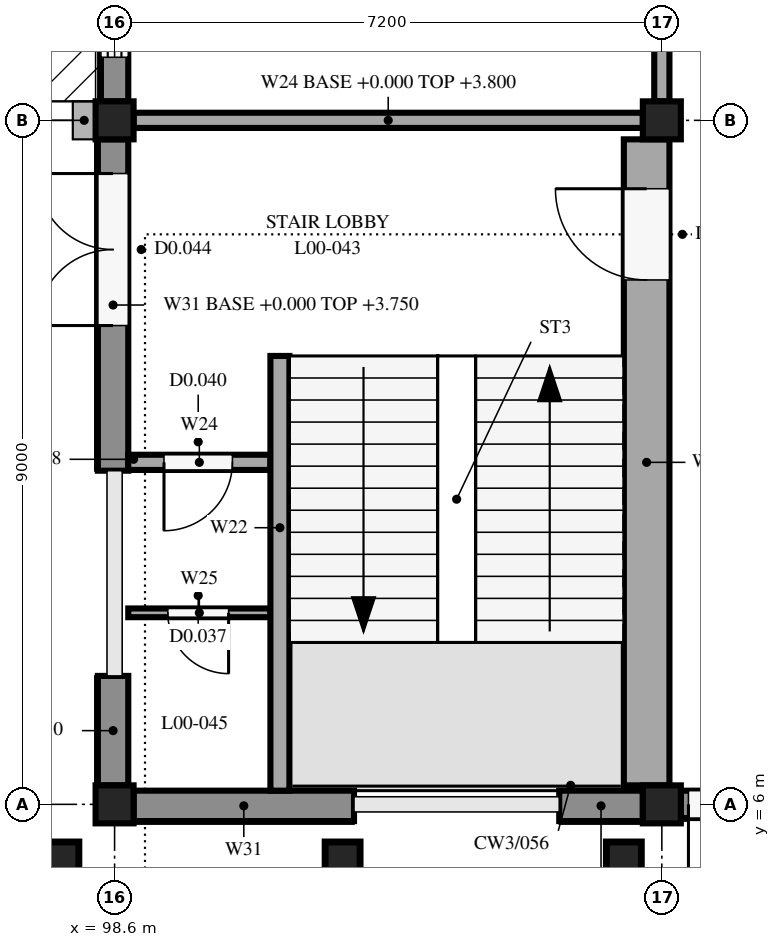
"""IFC4 building model, lengths in metres.
Left out: names, types, materials, properties, quantities, classifications, styles, units other than length and angle.
Written with IfcOpenShell. Run it as: python <this file> out.ifc"""

import sys

from ifc_helpers import new_model, si_unit, direction, frame, frame_2d, origin, origin_2d, place, context, subcontext, project, spatial, rectangle, extrude, element, fill, save


model = new_model("IFC4")
c1 = context("Model", 3, precision=1e-05, world=origin(), true_north=direction((0.0, 1.0)))
c2 = subcontext(c1, "Body", "Model", "MODEL_VIEW")
j1 = project(units=[si_unit("LENGTHUNIT", "METRE"), si_unit("PLANEANGLEUNIT", "RADIAN")], contexts=[c1])
p1 = place(None, origin())
s1 = spatial("IfcSite", under=j1, at=p1, CompositionType="ELEMENT")
p2 = place(p1, origin())
s2 = spatial("IfcBuilding", under=s1, at=p2, CompositionType="ELEMENT")
p3 = place(p2, origin())
s3 = spatial("IfcBuildingStorey", under=s2, at=p3, CompositionType="ELEMENT", Elevation=0.0)
for number, where, z_axis, x_axis in (
    (1, (98.6, 6.0, 0.0), (0.0, 0.0, 1.0), (1.0, 0.0, 0.0)),
    (2, (98.6, 15.0, 0.0), (0.0, 0.0, 1.0), (1.0, 0.0, 0.0)),
    (3, (105.8, 6.0, 0.0), (0.0, 0.0, 1.0), (1.0, 0.0, 0.0)),
    (4, (105.8, 15.0, 0.0), (0.0, 0.0, 1.0), (1.0, 0.0, 0.0)),
):
    element("IfcColumn", number, at=place(p3, frame(where, z_axis=z_axis, x_axis=x_axis)), inside=s3, PredefinedType="COLUMN", context=c2, shape_type="SweptSolid", body=[
        extrude(rectangle(XDim=0.5, YDim=0.5, at=origin_2d()), origin(), (0.0, 0.0, 1.0), 4.25),
    ])
for number, where, z_axis, x_axis in (
    (5, (97.9, 5.275, -0.3), (0.0, 0.0, 1.0), (1.0, 0.0, 0.0)),
    (6, (101.6, 5.275, -0.3), (0.0, 0.0, 1.0), (1.0, 0.0, 0.0)),
    (7, (105.3, 5.275, -0.3), (0.0, 0.0, 1.0), (1.0, 0.0, 0.0)),
):
    element("IfcColumn", number, at=place(p3, frame(where, z_axis=z_axis, x_axis=x_axis)), inside=s3, PredefinedType="COLUMN", context=c2, shape_type="SweptSolid", body=[
        extrude(rectangle(XDim=0.45, YDim=0.45, at=origin_2d()), origin(), (0.0, 0.0, 1.0), 3.95),
    ])
p4 = place(p3, frame((98.58, 6.25, 0.0), z_axis=(0.0, 0.0, 1.0), x_axis=(0.0, 1.0, 0.0)))
e8 = element("IfcWall", 8, at=p4, inside=s3, PredefinedType="STANDARD", context=c2, shape_type="SweptSolid", body=[
    extrude(rectangle(XDim=1.44, YDim=0.4, at=frame_2d((0.72, 0.0))), origin(), (0.0, 0.0, 1.0), 3.75),
])
p5 = place(p3, frame((98.58, 10.39, 0.0), z_axis=(0.0, 0.0, 1.0), x_axis=(0.0, 1.0, 0.0)))
e9 = element("IfcWall", 9, at=p5, inside=s3, PredefinedType="STANDARD", context=c2, shape_type="SweptSolid", body=[
    extrude(rectangle(XDim=4.36, YDim=0.4, at=frame_2d((2.18, 0.0))), origin(), (0.0, 0.0, 1.0), 3.75),
])
p6 = place(p5, frame((1.91, 0.0, 0.0)))
e10 = element("IfcOpeningElement", 10, at=p6, cuts=e9, PredefinedType="OPENING", context=c2, shape_type="SweptSolid", body=[
    extrude(rectangle(XDim=2.0, YDim=2.2, at=frame_2d((1.0, 1.1))), frame((0.0, 0.21, 0.0), z_axis=(0.0, -1.0, 0.0), x_axis=(1.0, 0.0, 0.0)), (0.0, 0.0, 1.0), 0.42),
])
p7 = place(p3, frame((98.6, 15.25, 0.0), z_axis=(0.0, 0.0, 1.0), x_axis=(0.0, 1.0, 0.0)))
e11 = element("IfcWall", 11, at=p7, inside=s3, PredefinedType="STANDARD", context=c2, shape_type="SweptSolid", body=[
    extrude(rectangle(XDim=8.5, YDim=0.36, at=frame_2d((4.25, 0.0))), origin(), (0.0, 0.0, 1.0), 3.75),
])
p8 = place(p7, frame((0.58, 0.0, 1.2)))
e12 = element("IfcOpeningElement", 12, at=p8, cuts=e11, PredefinedType="OPENING", context=c2, shape_type="SweptSolid", body=[
    extrude(rectangle(XDim=1.4, YDim=2.4, at=frame_2d((0.7, 1.2))), frame((0.0, 0.19, 0.0), z_axis=(0.0, -1.0, 0.0), x_axis=(1.0, 0.0, 0.0)), (0.0, 0.0, 1.0), 0.38),
])
p9 = place(p7, frame((2.56, 0.0, 1.2)))
e13 = element("IfcOpeningElement", 13, at=p9, cuts=e11, PredefinedType="OPENING", context=c2, shape_type="SweptSolid", body=[
    extrude(rectangle(XDim=1.4, YDim=2.4, at=frame_2d((0.7, 1.2))), frame((0.0, 0.19, 0.0), z_axis=(0.0, -1.0, 0.0), x_axis=(1.0, 0.0, 0.0)), (0.0, 0.0, 1.0), 0.38),
])
p10 = place(p7, frame((4.54, 0.0, 1.2)))
e14 = element("IfcOpeningElement", 14, at=p10, cuts=e11, PredefinedType="OPENING", context=c2, shape_type="SweptSolid", body=[
    extrude(rectangle(XDim=1.4, YDim=2.4, at=frame_2d((0.7, 1.2))), frame((0.0, 0.19, 0.0), z_axis=(0.0, -1.0, 0.0), x_axis=(1.0, 0.0, 0.0)), (0.0, 0.0, 1.0), 0.38),
])
p11 = place(p7, frame((6.52, 0.0, 1.2)))
e15 = element("IfcOpeningElement", 15, at=p11, cuts=e11, PredefinedType="OPENING", context=c2, shape_type="SweptSolid", body=[
    extrude(rectangle(XDim=1.4, YDim=2.4, at=frame_2d((0.7, 1.2))), frame((0.0, 0.19, 0.0), z_axis=(0.0, -1.0, 0.0), x_axis=(1.0, 0.0, 0.0)), (0.0, 0.0, 1.0), 0.38),
])
p12 = place(p3, frame((101.75, 5.98, 0.0), z_axis=(0.0, 0.0, 1.0), x_axis=(-1.0, 0.0, 0.0)))
e16 = element("IfcWall", 16, at=p12, inside=s3, PredefinedType="STANDARD", context=c2, shape_type="SweptSolid", body=[
    extrude(rectangle(XDim=2.9, YDim=0.4, at=frame_2d((1.45, 0.0))), origin(), (0.0, 0.0, 1.0), 3.8),
])
p13 = place(p3, frame((105.55, 5.98, 0.0), z_axis=(0.0, 0.0, 1.0), x_axis=(-1.0, 0.0, 0.0)))
e17 = element("IfcWall", 17, at=p13, inside=s3, PredefinedType="STANDARD", context=c2, shape_type="SweptSolid", body=[
    extrude(rectangle(XDim=1.1, YDim=0.4, at=frame_2d((0.55, 0.0))), origin(), (0.0, 0.0, 1.0), 3.8),
])
p14 = place(p3, frame((108.25, 6.0, 0.0), z_axis=(0.0, 0.0, 1.0), x_axis=(-1.0, 0.0, 0.0)))
e18 = element("IfcWall", 18, at=p14, inside=s3, PredefinedType="STANDARD", context=c2, shape_type="SweptSolid", body=[
    extrude(rectangle(XDim=2.2, YDim=0.36, at=frame_2d((1.1, 0.0))), origin(), (0.0, 0.0, 1.0), 3.9),
])
p15 = place(p14, frame((0.1, 0.0, 0.0)))
e19 = element("IfcOpeningElement", 19, at=p15, cuts=e18, PredefinedType="OPENING", context=c2, shape_type="SweptSolid", body=[
    extrude(rectangle(XDim=2.0, YDim=2.4, at=frame_2d((1.0, 1.2))), frame((0.0, 0.19, 0.0), z_axis=(0.0, -1.0, 0.0), x_axis=(1.0, 0.0, 0.0)), (0.0, 0.0, 1.0), 0.38),
])
p16 = place(p3, frame((100.775, 6.18, 0.0), z_axis=(0.0, 0.0, 1.0), x_axis=(0.0, 1.0, 0.0)))
e20 = element("IfcWall", 20, at=p16, inside=s3, PredefinedType="SOLIDWALL", context=c2, shape_type="SweptSolid", body=[
    extrude(rectangle(XDim=5.72, YDim=0.25, at=frame_2d((2.86, 0.0))), origin(), (0.0, 0.0, 1.0), 4.25),
])
p17 = place(p3, frame((105.6, 6.25, 0.0), z_axis=(0.0, 0.0, 1.0), x_axis=(0.0, 1.0, 0.0)))
e21 = element("IfcWall", 21, at=p17, inside=s3, PredefinedType="SOLIDWALL", context=c2, shape_type="SweptSolid", body=[
    extrude(rectangle(XDim=8.5, YDim=0.6, at=frame_2d((4.25, 0.0))), origin(), (0.0, 0.0, 1.0), 4.25),
])
p18 = place(p17, frame((6.65, 0.0, 0.0)))
e22 = element("IfcOpeningElement", 22, at=p18, cuts=e21, PredefinedType="OPENING", context=c2, shape_type="SweptSolid", body=[
    extrude(rectangle(XDim=1.2, YDim=2.1, at=frame_2d((0.6, 1.05))), frame((0.0, 0.31, 0.0), z_axis=(0.0, -1.0, 0.0), x_axis=(1.0, 0.0, 0.0)), (0.0, 0.0, 1.0), 0.62),
])
p19 = place(p3, frame((100.65, 10.5, 0.0), z_axis=(0.0, 0.0, 1.0), x_axis=(-1.0, 0.0, 0.0)))
e23 = element("IfcWall", 23, at=p19, inside=s3, PredefinedType="SOLIDWALL", context=c2, shape_type="SweptSolid", body=[
    extrude(rectangle(XDim=1.87, YDim=0.2, at=frame_2d((0.935, 0.0))), origin(), (0.0, 0.0, 1.0), 4.25),
])
p20 = place(p19, frame((0.5, 0.0, 0.0)))
e24 = element("IfcOpeningElement", 24, at=p20, cuts=e23, PredefinedType="OPENING", context=c2, shape_type="SweptSolid", body=[
    extrude(rectangle(XDim=0.9, YDim=2.1, at=frame_2d((0.45, 1.05))), frame((0.0, 0.11, 0.0), z_axis=(0.0, -1.0, 0.0), x_axis=(1.0, 0.0, 0.0)), (0.0, 0.0, 1.0), 0.22),
])
p21 = place(p3, frame((100.65, 8.52, 0.0), z_axis=(0.0, 0.0, 1.0), x_axis=(-1.0, 0.0, 0.0)))
e25 = element("IfcWall", 25, at=p21, inside=s3, PredefinedType="PARTITIONING", context=c2, shape_type="SweptSolid", body=[
    extrude(rectangle(XDim=1.87, YDim=0.115, at=frame_2d((0.935, 0.0))), origin(), (0.0, 0.0, 1.0), 4.25),
])
p22 = place(p21, frame((0.55, 0.0, 0.0)))
e26 = element("IfcOpeningElement", 26, at=p22, cuts=e25, PredefinedType="OPENING", context=c2, shape_type="SweptSolid", body=[
    extrude(rectangle(XDim=0.8, YDim=2.1, at=frame_2d((0.4, 1.05))), frame((0.0, 0.067, 0.0), z_axis=(0.0, -1.0, 0.0), x_axis=(1.0, 0.0, 0.0)), (0.0, 0.0, 1.0), 0.135),
])
p23 = place(p3, frame((98.85, 15.0, 0.0), z_axis=(0.0, 0.0, 1.0), x_axis=(1.0, 0.0, 0.0)))
e27 = element("IfcWall", 27, at=p23, inside=s3, PredefinedType="SOLIDWALL", context=c2, shape_type="SweptSolid", body=[
    extrude(rectangle(XDim=6.7, YDim=0.2, at=frame_2d((3.35, 0.0))), origin(), (0.0, 0.0, 1.0), 3.8),
])
p24 = place(p3, frame((105.8, 15.25, 0.0), z_axis=(0.0, 0.0, 1.0), x_axis=(0.0, 1.0, 0.0)))
e28 = element("IfcWall", 28, at=p24, inside=s3, PredefinedType="PARTITIONING", context=c2, shape_type="SweptSolid", body=[
    extrude(rectangle(XDim=8.5, YDim=0.2, at=frame_2d((4.25, 0.0))), origin(), (0.0, 0.0, 1.0), 3.8),
])
p25 = place(p24, frame((3.75, 0.0, 0.0)))
e29 = element("IfcOpeningElement", 29, at=p25, cuts=e28, PredefinedType="OPENING", context=c2, shape_type="SweptSolid", body=[
    extrude(rectangle(XDim=1.0, YDim=2.1, at=frame_2d((0.5, 1.05))), frame((0.0, 0.11, 0.0), z_axis=(0.0, -1.0, 0.0), x_axis=(1.0, 0.0, 0.0)), (0.0, 0.0, 1.0), 0.22),
])
p26 = place(p6, origin())
e30 = element("IfcDoor", 30, at=p26, inside=s3, OperationType="DOUBLE_DOOR_SINGLE_SWING", PredefinedType="DOOR", context=c2, shape_type="SweptSolid", body=[
    extrude(rectangle(XDim=2.0, YDim=2.2, at=frame_2d((1.0, 1.1))), frame((0.0, 0.025, 0.0), z_axis=(0.0, -1.0, 0.0), x_axis=(1.0, 0.0, 0.0)), (0.0, 0.0, 1.0), 0.05),
])
fill(e10, e30)
p27 = place(p8, origin())
e31 = element("IfcWindow", 31, at=p27, inside=s3, PartitioningType="DOUBLE_PANEL_VERTICAL", PredefinedType="WINDOW", context=c2, shape_type="SweptSolid", body=[
    extrude(rectangle(XDim=1.4, YDim=2.4, at=frame_2d((0.7, 1.2))), frame((0.0, 0.03, 0.0), z_axis=(0.0, -1.0, 0.0), x_axis=(1.0, 0.0, 0.0)), (0.0, 0.0, 1.0), 0.06),
])
fill(e12, e31)
p28 = place(p15, origin())
e32 = element("IfcDoor", 32, at=p28, inside=s3, OperationType="DOUBLE_DOOR_SINGLE_SWING", PredefinedType="DOOR", context=c2, shape_type="SweptSolid", body=[
    extrude(rectangle(XDim=2.0, YDim=2.4, at=frame_2d((1.0, 1.2))), frame((0.0, 0.025, 0.0), z_axis=(0.0, -1.0, 0.0), x_axis=(1.0, 0.0, 0.0)), (0.0, 0.0, 1.0), 0.05),
])
fill(e19, e32)
p29 = place(p18, origin())
e33 = element("IfcDoor", 33, at=p29, inside=s3, OperationType="SINGLE_SWING_RIGHT", PredefinedType="DOOR", context=c2, shape_type="SweptSolid", body=[
    extrude(rectangle(XDim=1.2, YDim=2.1, at=frame_2d((0.6, 1.05))), frame((0.0, 0.025, 0.0), z_axis=(0.0, -1.0, 0.0), x_axis=(1.0, 0.0, 0.0)), (0.0, 0.0, 1.0), 0.05),
])
fill(e22, e33)
p30 = place(p20, origin())
e34 = element("IfcDoor", 34, at=p30, inside=s3, OperationType="SINGLE_SWING_RIGHT", PredefinedType="DOOR", context=c2, shape_type="SweptSolid", body=[
    extrude(rectangle(XDim=0.9, YDim=2.1, at=frame_2d((0.45, 1.05))), frame((0.0, 0.025, 0.0), z_axis=(0.0, -1.0, 0.0), x_axis=(1.0, 0.0, 0.0)), (0.0, 0.0, 1.0), 0.05),
])
fill(e24, e34)
p31 = place(p22, origin())
e35 = element("IfcDoor", 35, at=p31, inside=s3, OperationType="SINGLE_SWING_LEFT", PredefinedType="DOOR", context=c2, shape_type="SweptSolid", body=[
    extrude(rectangle(XDim=0.8, YDim=2.1, at=frame_2d((0.4, 1.05))), frame((0.0, 0.025, 0.0), z_axis=(0.0, -1.0, 0.0), x_axis=(1.0, 0.0, 0.0)), (0.0, 0.0, 1.0), 0.05),
])
fill(e26, e35)
save(model, sys.argv[1])
